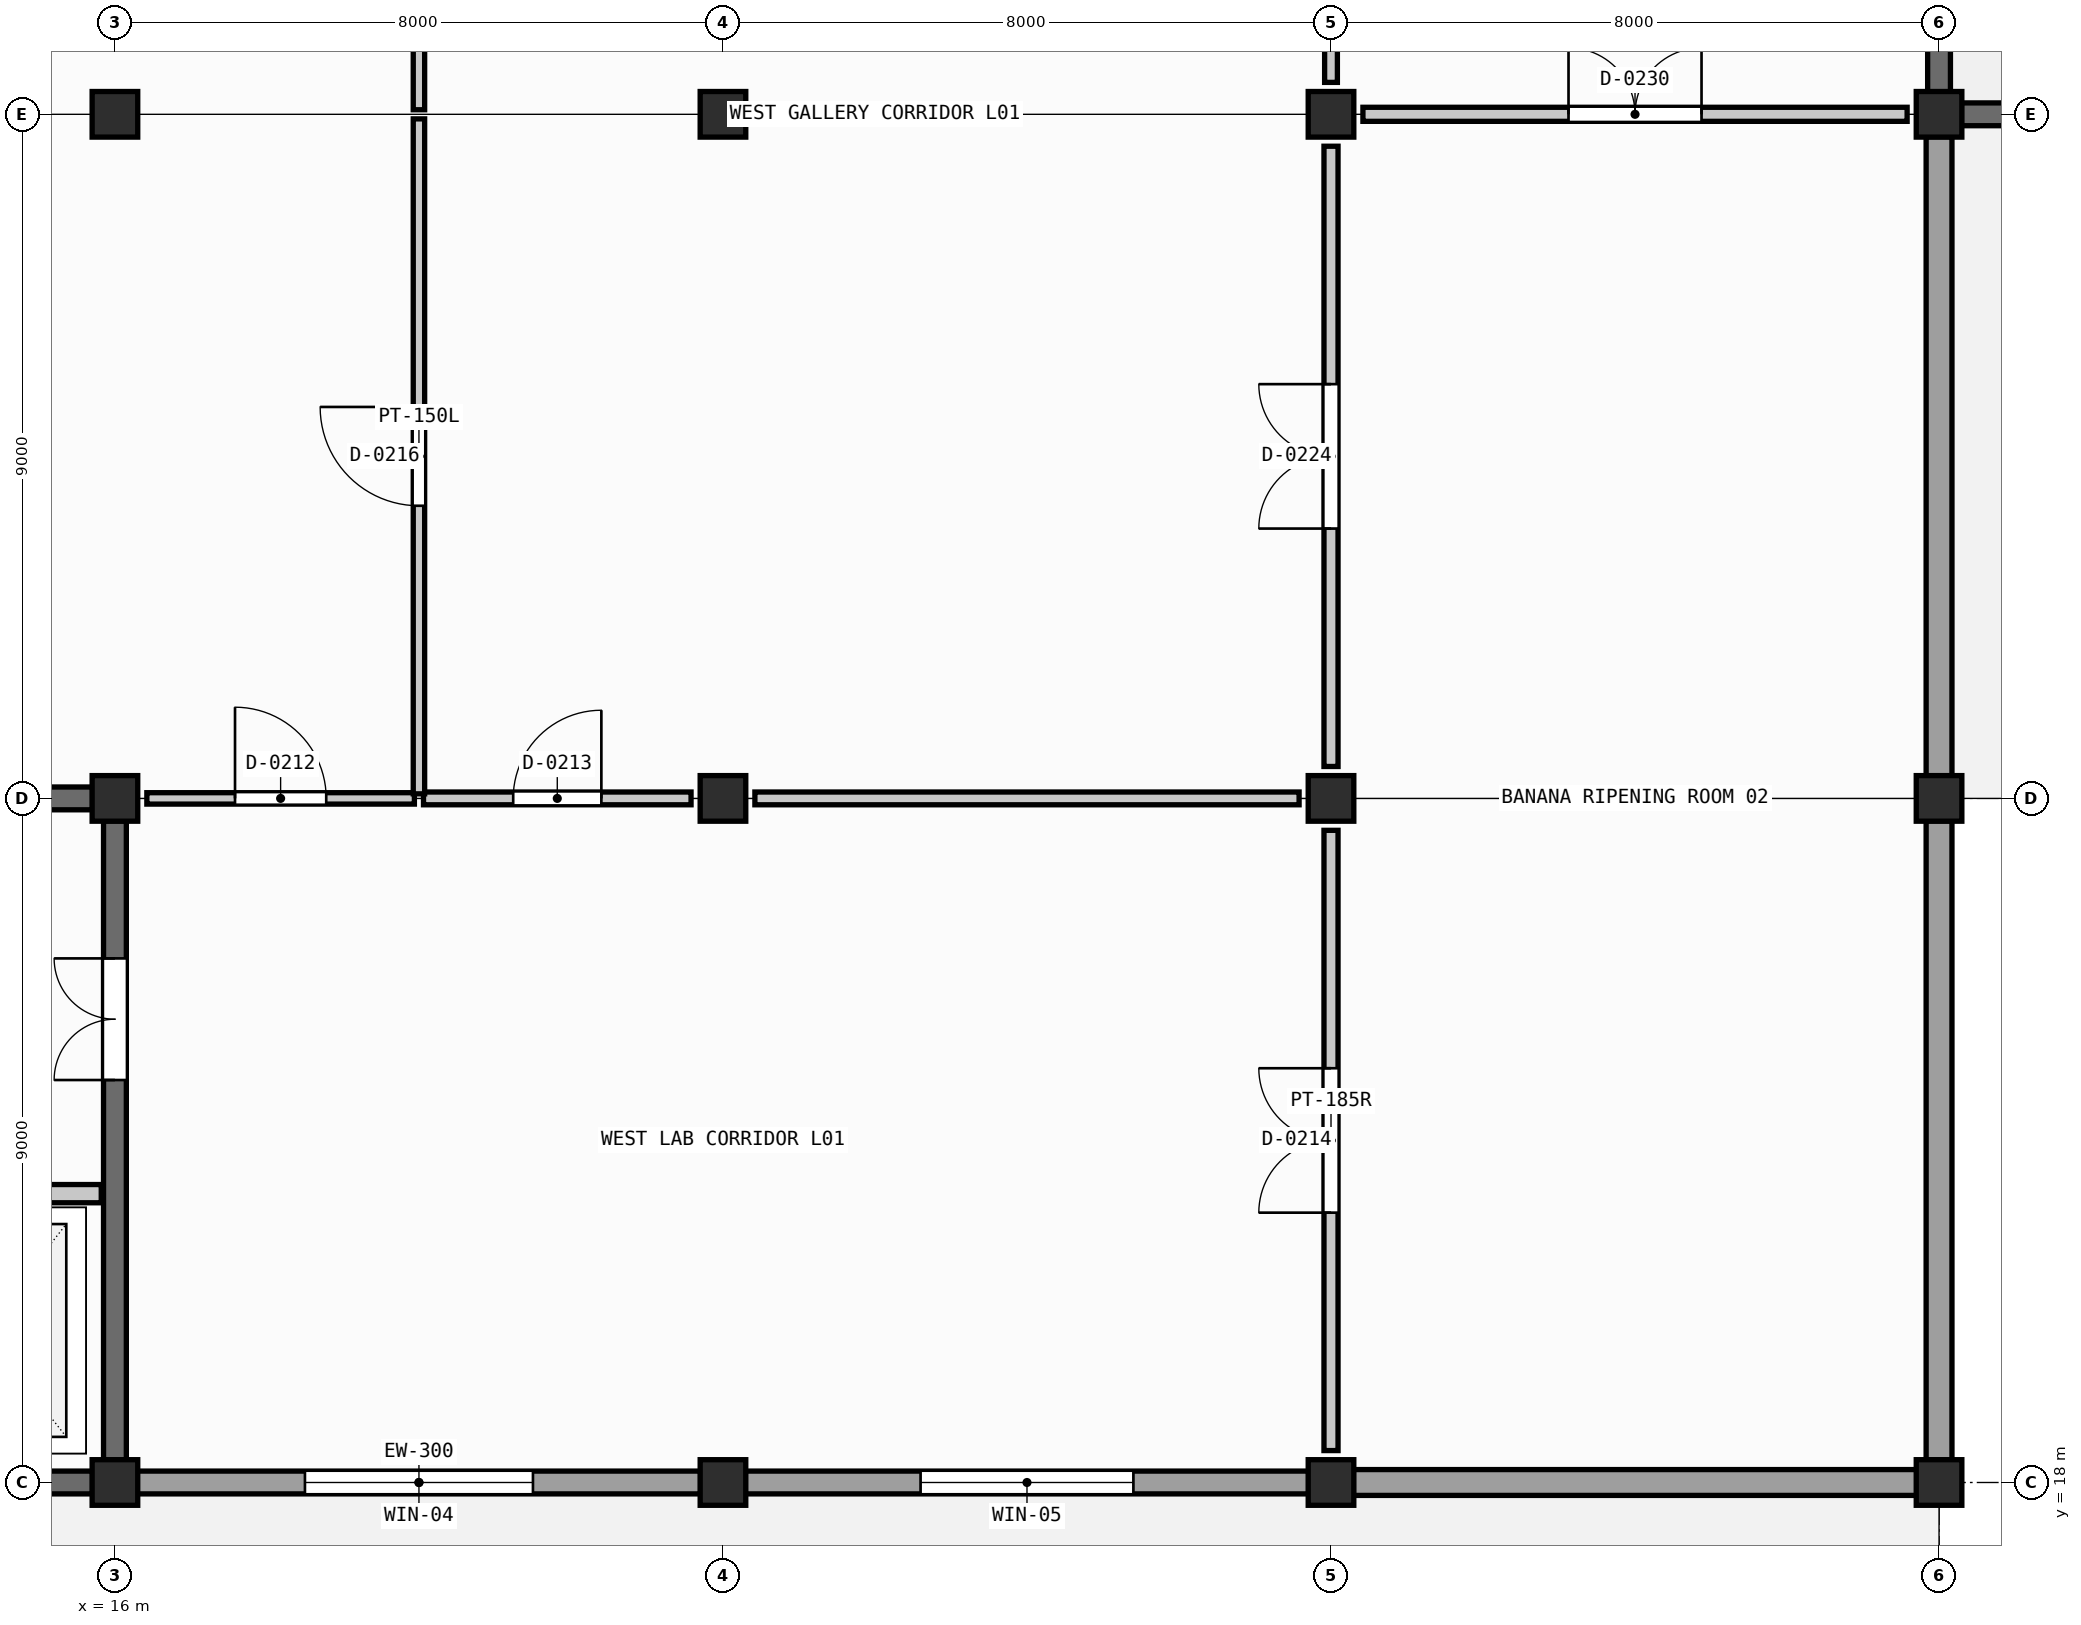
"""IFC4 building model, lengths in metres.
Left out: names, types, materials, properties, quantities, classifications, styles, units other than length and angle.
Written with IfcOpenShell. Run it as: python <this file> out.ifc"""

import sys

from ifc_helpers import new_model, si_unit, direction, frame, frame_2d, origin, origin_2d, place, context, subcontext, project, spatial, rectangle, extrude, element, fill, save


model = new_model("IFC4")
c1 = context("Model", 3, precision=1e-05, world=origin(), true_north=direction((0.0, 1.0)))
c2 = subcontext(c1, "Body", "Model", "MODEL_VIEW")
j1 = project(units=[si_unit("LENGTHUNIT", "METRE"), si_unit("PLANEANGLEUNIT", "RADIAN")], contexts=[c1])
p1 = place(None, origin())
s1 = spatial("IfcSite", under=j1, at=p1, CompositionType="ELEMENT")
p2 = place(p1, origin())
s2 = spatial("IfcBuilding", under=s1, at=p2, CompositionType="ELEMENT")
p3 = place(p2, frame((0.0, 0.0, 4.8)))
s3 = spatial("IfcBuildingStorey", under=s2, at=p3, CompositionType="ELEMENT", Elevation=4.8)
for number, where, z_axis, x_axis in (
    (1, (16.0, 18.0, 0.0), (0.0, 0.0, 1.0), (1.0, 0.0, 0.0)),
    (2, (16.0, 27.0, 0.0), (0.0, 0.0, 1.0), (1.0, 0.0, 0.0)),
    (3, (16.0, 36.0, 0.0), (0.0, 0.0, 1.0), (1.0, 0.0, 0.0)),
    (4, (24.0, 18.0, 0.0), (0.0, 0.0, 1.0), (1.0, 0.0, 0.0)),
    (5, (24.0, 27.0, 0.0), (0.0, 0.0, 1.0), (1.0, 0.0, 0.0)),
    (6, (24.0, 36.0, 0.0), (0.0, 0.0, 1.0), (1.0, 0.0, 0.0)),
    (7, (32.0, 18.0, 0.0), (0.0, 0.0, 1.0), (1.0, 0.0, 0.0)),
    (8, (32.0, 27.0, 0.0), (0.0, 0.0, 1.0), (1.0, 0.0, 0.0)),
    (9, (32.0, 36.0, 0.0), (0.0, 0.0, 1.0), (1.0, 0.0, 0.0)),
    (10, (40.0, 18.0, 0.0), (0.0, 0.0, 1.0), (1.0, 0.0, 0.0)),
    (11, (40.0, 27.0, 0.0), (0.0, 0.0, 1.0), (1.0, 0.0, 0.0)),
    (12, (40.0, 36.0, 0.0), (0.0, 0.0, 1.0), (1.0, 0.0, 0.0)),
):
    element("IfcColumn", number, at=place(p3, frame(where, z_axis=z_axis, x_axis=x_axis)), inside=s3, PredefinedType="COLUMN", context=c2, shape_type="SweptSolid", body=[
        extrude(rectangle(XDim=0.6, YDim=0.6, at=origin_2d()), origin(), (0.0, 0.0, 1.0), 4.2),
    ])
p4 = place(p3, frame((16.295, 18.0, 0.0), z_axis=(0.0, 0.0, 1.0), x_axis=(1.0, 0.0, 0.0)))
e13 = element("IfcWall", 13, at=p4, inside=s3, PredefinedType="SOLIDWALL", context=c2, shape_type="SweptSolid", body=[
    extrude(rectangle(XDim=7.41, YDim=0.3, at=frame_2d((3.705, 0.0))), origin(), (0.0, 0.0, 1.0), 3.05),
])
p5 = place(p4, frame((2.205, 0.0, 1.0)))
e14 = element("IfcOpeningElement", 14, at=p5, cuts=e13, PredefinedType="OPENING", context=c2, shape_type="SweptSolid", body=[
    extrude(rectangle(XDim=3.0, YDim=1.65, at=frame_2d((1.5, 0.825))), frame((0.0, 0.16, 0.0), z_axis=(0.0, -1.0, 0.0), x_axis=(1.0, 0.0, 0.0)), (0.0, 0.0, 1.0), 0.32),
])
p6 = place(p3, frame((24.295, 18.0, 0.0), z_axis=(0.0, 0.0, 1.0), x_axis=(1.0, 0.0, 0.0)))
e15 = element("IfcWall", 15, at=p6, inside=s3, PredefinedType="SOLIDWALL", context=c2, shape_type="SweptSolid", body=[
    extrude(rectangle(XDim=7.41, YDim=0.3, at=frame_2d((3.705, 0.0))), origin(), (0.0, 0.0, 1.0), 3.05),
])
p7 = place(p6, frame((2.305, 0.0, 1.0)))
e16 = element("IfcOpeningElement", 16, at=p7, cuts=e15, PredefinedType="OPENING", context=c2, shape_type="SweptSolid", body=[
    extrude(rectangle(XDim=2.8, YDim=1.6, at=frame_2d((1.4, 0.8))), frame((0.0, 0.16, 0.0), z_axis=(0.0, -1.0, 0.0), x_axis=(1.0, 0.0, 0.0)), (0.0, 0.0, 1.0), 0.32),
])
p8 = place(p3, frame((32.295, 18.0, 0.0), z_axis=(0.0, 0.0, 1.0), x_axis=(1.0, 0.0, 0.0)))
e17 = element("IfcWall", 17, at=p8, inside=s3, PredefinedType="SOLIDWALL", context=c2, shape_type="SweptSolid", body=[
    extrude(rectangle(XDim=7.41, YDim=0.34, at=frame_2d((3.705, 0.0))), origin(), (0.0, 0.0, 1.0), 3.05),
])
for number, where, z_axis, x_axis in (
    (18, (40.0, 18.295, 0.0), (0.0, 0.0, 1.0), (0.0, 1.0, 0.0)),
    (19, (40.0, 27.295, 0.0), (0.0, 0.0, 1.0), (0.0, 1.0, 0.0)),
):
    element("IfcWall", number, at=place(p3, frame(where, z_axis=z_axis, x_axis=x_axis)), inside=s3, PredefinedType="SOLIDWALL", context=c2, shape_type="SweptSolid", body=[
        extrude(rectangle(XDim=8.41, YDim=0.34, at=frame_2d((4.205, 0.0))), origin(), (0.0, 0.0, 1.0), 3.05),
    ])
for number, where, z_axis, x_axis in (
    (20, (8.295, 18.0, 0.0), (0.0, 0.0, 1.0), (1.0, 0.0, 0.0)),
    (21, (8.295, 27.0, 0.0), (0.0, 0.0, 1.0), (1.0, 0.0, 0.0)),
):
    element("IfcWall", number, at=place(p3, frame(where, z_axis=z_axis, x_axis=x_axis)), inside=s3, PredefinedType="SHEAR", context=c2, shape_type="SweptSolid", body=[
        extrude(rectangle(XDim=7.41, YDim=0.3, at=frame_2d((3.705, 0.0))), origin(), (0.0, 0.0, 1.0), 3.895),
    ])
p9 = place(p3, frame((16.0, 18.295, 0.0), z_axis=(0.0, 0.0, 1.0), x_axis=(0.0, 1.0, 0.0)))
e22 = element("IfcWall", 22, at=p9, inside=s3, PredefinedType="SHEAR", context=c2, shape_type="SweptSolid", body=[
    extrude(rectangle(XDim=8.41, YDim=0.3, at=frame_2d((4.205, 0.0))), origin(), (0.0, 0.0, 1.0), 3.895),
])
p10 = place(p9, frame((5.0, 0.0, 0.0)))
e23 = element("IfcOpeningElement", 23, at=p10, cuts=e22, PredefinedType="OPENING", context=c2, shape_type="SweptSolid", body=[
    extrude(rectangle(XDim=1.6, YDim=2.2, at=frame_2d((0.8, 1.1))), frame((0.0, 0.16, 0.0), z_axis=(0.0, -1.0, 0.0), x_axis=(1.0, 0.0, 0.0)), (0.0, 0.0, 1.0), 0.32),
])
p11 = place(p3, frame((12.75, 21.8, 0.0), z_axis=(0.0, 0.0, 1.0), x_axis=(1.0, 0.0, 0.0)))
e24 = element("IfcWall", 24, at=p11, inside=s3, PredefinedType="SHEAR", context=c2, shape_type="SweptSolid", body=[
    extrude(rectangle(XDim=3.07, YDim=0.24, at=frame_2d((1.535, 0.0))), origin(), (0.0, 0.0, 1.0), 3.245),
])
p12 = place(p11, frame((0.835, 0.0, 0.0)))
e25 = element("IfcOpeningElement", 25, at=p12, cuts=e24, PredefinedType="OPENING", context=c2, shape_type="SweptSolid", body=[
    extrude(rectangle(XDim=1.4, YDim=2.3, at=frame_2d((0.7, 1.15))), frame((0.0, 0.13, 0.0), z_axis=(0.0, -1.0, 0.0), x_axis=(1.0, 0.0, 0.0)), (0.0, 0.0, 1.0), 0.26),
])
p13 = place(p3, frame((40.295, 36.0, 0.0), z_axis=(0.0, 0.0, 1.0), x_axis=(1.0, 0.0, 0.0)))
e26 = element("IfcWall", 26, at=p13, inside=s3, PredefinedType="SHEAR", context=c2, shape_type="SweptSolid", body=[
    extrude(rectangle(XDim=7.41, YDim=0.3, at=frame_2d((3.705, 0.0))), origin(), (0.0, 0.0, 1.0), 3.905),
])
p14 = place(p3, frame((40.0, 36.295, 0.0), z_axis=(0.0, 0.0, 1.0), x_axis=(0.0, 1.0, 0.0)))
e27 = element("IfcWall", 27, at=p14, inside=s3, PredefinedType="SHEAR", context=c2, shape_type="SweptSolid", body=[
    extrude(rectangle(XDim=8.41, YDim=0.3, at=frame_2d((4.205, 0.0))), origin(), (0.0, 0.0, 1.0), 3.905),
])
p15 = place(p3, frame((16.42, 27.0, 0.0), z_axis=(0.0, 0.0, 1.0), x_axis=(1.0, 0.0, 0.0)))
e28 = element("IfcWall", 28, at=p15, inside=s3, PredefinedType="PARTITIONING", context=c2, shape_type="SweptSolid", body=[
    extrude(rectangle(XDim=3.52, YDim=0.15, at=frame_2d((1.76, 0.0))), origin(), (0.0, 0.0, 1.0), 3.05),
])
p16 = place(p15, frame((1.16, 0.0, 0.0)))
e29 = element("IfcOpeningElement", 29, at=p16, cuts=e28, PredefinedType="OPENING", context=c2, shape_type="SweptSolid", body=[
    extrude(rectangle(XDim=1.2, YDim=2.15, at=frame_2d((0.6, 1.075))), frame((0.0, 0.085, 0.0), z_axis=(0.0, -1.0, 0.0), x_axis=(1.0, 0.0, 0.0)), (0.0, 0.0, 1.0), 0.17),
])
p17 = place(p3, frame((20.06, 27.0, 0.0), z_axis=(0.0, 0.0, 1.0), x_axis=(1.0, 0.0, 0.0)))
e30 = element("IfcWall", 30, at=p17, inside=s3, PredefinedType="PARTITIONING", context=c2, shape_type="SweptSolid", body=[
    extrude(rectangle(XDim=3.52, YDim=0.168, at=frame_2d((1.76, 0.0))), origin(), (0.0, 0.0, 1.0), 3.05),
])
p18 = place(p17, frame((1.18, 0.0, 0.0)))
e31 = element("IfcOpeningElement", 31, at=p18, cuts=e30, PredefinedType="OPENING", context=c2, shape_type="SweptSolid", body=[
    extrude(rectangle(XDim=1.16, YDim=2.21, at=frame_2d((0.58, 1.105))), frame((0.0, 0.094, 0.0), z_axis=(0.0, -1.0, 0.0), x_axis=(1.0, 0.0, 0.0)), (0.0, 0.0, 1.0), 0.188),
])
p19 = place(p3, frame((24.42, 27.0, 0.0), z_axis=(0.0, 0.0, 1.0), x_axis=(1.0, 0.0, 0.0)))
e32 = element("IfcWall", 32, at=p19, inside=s3, PredefinedType="PARTITIONING", context=c2, shape_type="SweptSolid", body=[
    extrude(rectangle(XDim=7.16, YDim=0.168, at=frame_2d((3.58, 0.0))), origin(), (0.0, 0.0, 1.0), 3.05),
])
p20 = place(p3, frame((32.0, 18.42, 0.0), z_axis=(0.0, 0.0, 1.0), x_axis=(0.0, 1.0, 0.0)))
e33 = element("IfcWall", 33, at=p20, inside=s3, PredefinedType="PARTITIONING", context=c2, shape_type="SweptSolid", body=[
    extrude(rectangle(XDim=8.16, YDim=0.185, at=frame_2d((4.08, 0.0))), origin(), (0.0, 0.0, 1.0), 3.05),
])
p21 = place(p20, frame((3.13, 0.0, 0.0)))
e34 = element("IfcOpeningElement", 34, at=p21, cuts=e33, PredefinedType="OPENING", context=c2, shape_type="SweptSolid", body=[
    extrude(rectangle(XDim=1.9, YDim=2.45, at=frame_2d((0.95, 1.225))), frame((0.0, 0.103, 0.0), z_axis=(0.0, -1.0, 0.0), x_axis=(1.0, 0.0, 0.0)), (0.0, 0.0, 1.0), 0.205),
])
p22 = place(p3, frame((20.0, 27.06, 0.0), z_axis=(0.0, 0.0, 1.0), x_axis=(0.0, 1.0, 0.0)))
e35 = element("IfcWall", 35, at=p22, inside=s3, PredefinedType="PARTITIONING", context=c2, shape_type="SweptSolid", body=[
    extrude(rectangle(XDim=8.88, YDim=0.15, at=frame_2d((4.44, 0.0))), origin(), (0.0, 0.0, 1.0), 3.05),
])
p23 = place(p22, frame((3.79, 0.0, 0.0)))
e36 = element("IfcOpeningElement", 36, at=p23, cuts=e35, PredefinedType="OPENING", context=c2, shape_type="SweptSolid", body=[
    extrude(rectangle(XDim=1.3, YDim=2.15, at=frame_2d((0.65, 1.075))), frame((0.0, 0.085, 0.0), z_axis=(0.0, -1.0, 0.0), x_axis=(1.0, 0.0, 0.0)), (0.0, 0.0, 1.0), 0.17),
])
p24 = place(p3, frame((20.0, 36.06, 0.0), z_axis=(0.0, 0.0, 1.0), x_axis=(0.0, 1.0, 0.0)))
e37 = element("IfcWall", 37, at=p24, inside=s3, PredefinedType="PARTITIONING", context=c2, shape_type="SweptSolid", body=[
    extrude(rectangle(XDim=8.86, YDim=0.15, at=frame_2d((4.43, 0.0))), origin(), (0.0, 0.0, 1.0), 3.05),
])
p25 = place(p3, frame((32.0, 27.42, 0.0), z_axis=(0.0, 0.0, 1.0), x_axis=(0.0, 1.0, 0.0)))
e38 = element("IfcWall", 38, at=p25, inside=s3, PredefinedType="PARTITIONING", context=c2, shape_type="SweptSolid", body=[
    extrude(rectangle(XDim=8.16, YDim=0.185, at=frame_2d((4.08, 0.0))), origin(), (0.0, 0.0, 1.0), 3.05),
])
p26 = place(p25, frame((3.13, 0.0, 0.0)))
e39 = element("IfcOpeningElement", 39, at=p26, cuts=e38, PredefinedType="OPENING", context=c2, shape_type="SweptSolid", body=[
    extrude(rectangle(XDim=1.9, YDim=2.45, at=frame_2d((0.95, 1.225))), frame((0.0, 0.103, 0.0), z_axis=(0.0, -1.0, 0.0), x_axis=(1.0, 0.0, 0.0)), (0.0, 0.0, 1.0), 0.205),
])
p27 = place(p3, frame((32.0, 36.42, 0.0), z_axis=(0.0, 0.0, 1.0), x_axis=(0.0, 1.0, 0.0)))
e40 = element("IfcWall", 40, at=p27, inside=s3, PredefinedType="PARTITIONING", context=c2, shape_type="SweptSolid", body=[
    extrude(rectangle(XDim=8.16, YDim=0.168, at=frame_2d((4.08, 0.0))), origin(), (0.0, 0.0, 1.0), 3.05),
])
p28 = place(p27, frame((3.47, 0.0, 0.0)))
e41 = element("IfcOpeningElement", 41, at=p28, cuts=e40, PredefinedType="OPENING", context=c2, shape_type="SweptSolid", body=[
    extrude(rectangle(XDim=1.22, YDim=2.18, at=frame_2d((0.61, 1.09))), frame((0.0, 0.094, 0.0), z_axis=(0.0, -1.0, 0.0), x_axis=(1.0, 0.0, 0.0)), (0.0, 0.0, 1.0), 0.188),
])
p29 = place(p3, frame((32.42, 36.0, 0.0), z_axis=(0.0, 0.0, 1.0), x_axis=(1.0, 0.0, 0.0)))
e42 = element("IfcWall", 42, at=p29, inside=s3, PredefinedType="PARTITIONING", context=c2, shape_type="SweptSolid", body=[
    extrude(rectangle(XDim=7.16, YDim=0.185, at=frame_2d((3.58, 0.0))), origin(), (0.0, 0.0, 1.0), 3.05),
])
p30 = place(p29, frame((2.705, 0.0, 0.0)))
e43 = element("IfcOpeningElement", 43, at=p30, cuts=e42, PredefinedType="OPENING", context=c2, shape_type="SweptSolid", body=[
    extrude(rectangle(XDim=1.75, YDim=2.4, at=frame_2d((0.875, 1.2))), frame((0.0, 0.103, 0.0), z_axis=(0.0, -1.0, 0.0), x_axis=(1.0, 0.0, 0.0)), (0.0, 0.0, 1.0), 0.205),
])
p31 = place(p5, origin())
e44 = element("IfcWindow", 44, at=p31, inside=s3, PartitioningType="SINGLE_PANEL", PredefinedType="WINDOW", context=c2, shape_type="SweptSolid", body=[
    extrude(rectangle(XDim=3.0, YDim=1.65, at=frame_2d((1.5, 0.825))), frame((0.0, 0.03, 0.0), z_axis=(0.0, -1.0, 0.0), x_axis=(1.0, 0.0, 0.0)), (0.0, 0.0, 1.0), 0.06),
])
fill(e14, e44)
p32 = place(p7, origin())
e45 = element("IfcWindow", 45, at=p32, inside=s3, PartitioningType="SINGLE_PANEL", PredefinedType="WINDOW", context=c2, shape_type="SweptSolid", body=[
    extrude(rectangle(XDim=2.8, YDim=1.6, at=frame_2d((1.4, 0.8))), frame((0.0, 0.03, 0.0), z_axis=(0.0, -1.0, 0.0), x_axis=(1.0, 0.0, 0.0)), (0.0, 0.0, 1.0), 0.06),
])
fill(e16, e45)
p33 = place(p10, origin())
e46 = element("IfcDoor", 46, at=p33, inside=s3, OperationType="DOUBLE_DOOR_SINGLE_SWING", PredefinedType="DOOR", context=c2, shape_type="SweptSolid", body=[
    extrude(rectangle(XDim=1.6, YDim=2.2, at=frame_2d((0.8, 1.1))), frame((0.0, 0.025, 0.0), z_axis=(0.0, -1.0, 0.0), x_axis=(1.0, 0.0, 0.0)), (0.0, 0.0, 1.0), 0.05),
])
fill(e23, e46)
p34 = place(p16, origin())
e47 = element("IfcDoor", 47, at=p34, inside=s3, OperationType="SINGLE_SWING_LEFT", PredefinedType="DOOR", context=c2, shape_type="SweptSolid", body=[
    extrude(rectangle(XDim=1.2, YDim=2.15, at=frame_2d((0.6, 1.075))), frame((0.0, 0.025, 0.0), z_axis=(0.0, -1.0, 0.0), x_axis=(1.0, 0.0, 0.0)), (0.0, 0.0, 1.0), 0.05),
])
fill(e29, e47)
p35 = place(p18, origin())
e48 = element("IfcDoor", 48, at=p35, inside=s3, OperationType="SINGLE_SWING_RIGHT", PredefinedType="DOOR", context=c2, shape_type="SweptSolid", body=[
    extrude(rectangle(XDim=1.16, YDim=2.21, at=frame_2d((0.58, 1.105))), frame((0.0, 0.025, 0.0), z_axis=(0.0, -1.0, 0.0), x_axis=(1.0, 0.0, 0.0)), (0.0, 0.0, 1.0), 0.05),
])
fill(e31, e48)
p36 = place(p21, origin())
e49 = element("IfcDoor", 49, at=p36, inside=s3, OperationType="DOUBLE_DOOR_SINGLE_SWING", PredefinedType="DOOR", context=c2, shape_type="SweptSolid", body=[
    extrude(rectangle(XDim=1.9, YDim=2.45, at=frame_2d((0.95, 1.225))), frame((0.0, 0.025, 0.0), z_axis=(0.0, -1.0, 0.0), x_axis=(1.0, 0.0, 0.0)), (0.0, 0.0, 1.0), 0.05),
])
fill(e34, e49)
p37 = place(p23, origin())
e50 = element("IfcDoor", 50, at=p37, inside=s3, OperationType="SINGLE_SWING_RIGHT", PredefinedType="DOOR", context=c2, shape_type="SweptSolid", body=[
    extrude(rectangle(XDim=1.3, YDim=2.15, at=frame_2d((0.65, 1.075))), frame((0.0, 0.025, 0.0), z_axis=(0.0, -1.0, 0.0), x_axis=(1.0, 0.0, 0.0)), (0.0, 0.0, 1.0), 0.05),
])
fill(e36, e50)
p38 = place(p26, origin())
e51 = element("IfcDoor", 51, at=p38, inside=s3, OperationType="DOUBLE_DOOR_SINGLE_SWING", PredefinedType="DOOR", context=c2, shape_type="SweptSolid", body=[
    extrude(rectangle(XDim=1.9, YDim=2.45, at=frame_2d((0.95, 1.225))), frame((0.0, 0.025, 0.0), z_axis=(0.0, -1.0, 0.0), x_axis=(1.0, 0.0, 0.0)), (0.0, 0.0, 1.0), 0.05),
])
fill(e39, e51)
p39 = place(p30, origin())
e52 = element("IfcDoor", 52, at=p39, inside=s3, OperationType="DOUBLE_DOOR_SINGLE_SWING", PredefinedType="DOOR", context=c2, shape_type="SweptSolid", body=[
    extrude(rectangle(XDim=1.75, YDim=2.4, at=frame_2d((0.875, 1.2))), frame((0.0, 0.025, 0.0), z_axis=(0.0, -1.0, 0.0), x_axis=(1.0, 0.0, 0.0)), (0.0, 0.0, 1.0), 0.05),
])
fill(e43, e52)
save(model, sys.argv[1])
